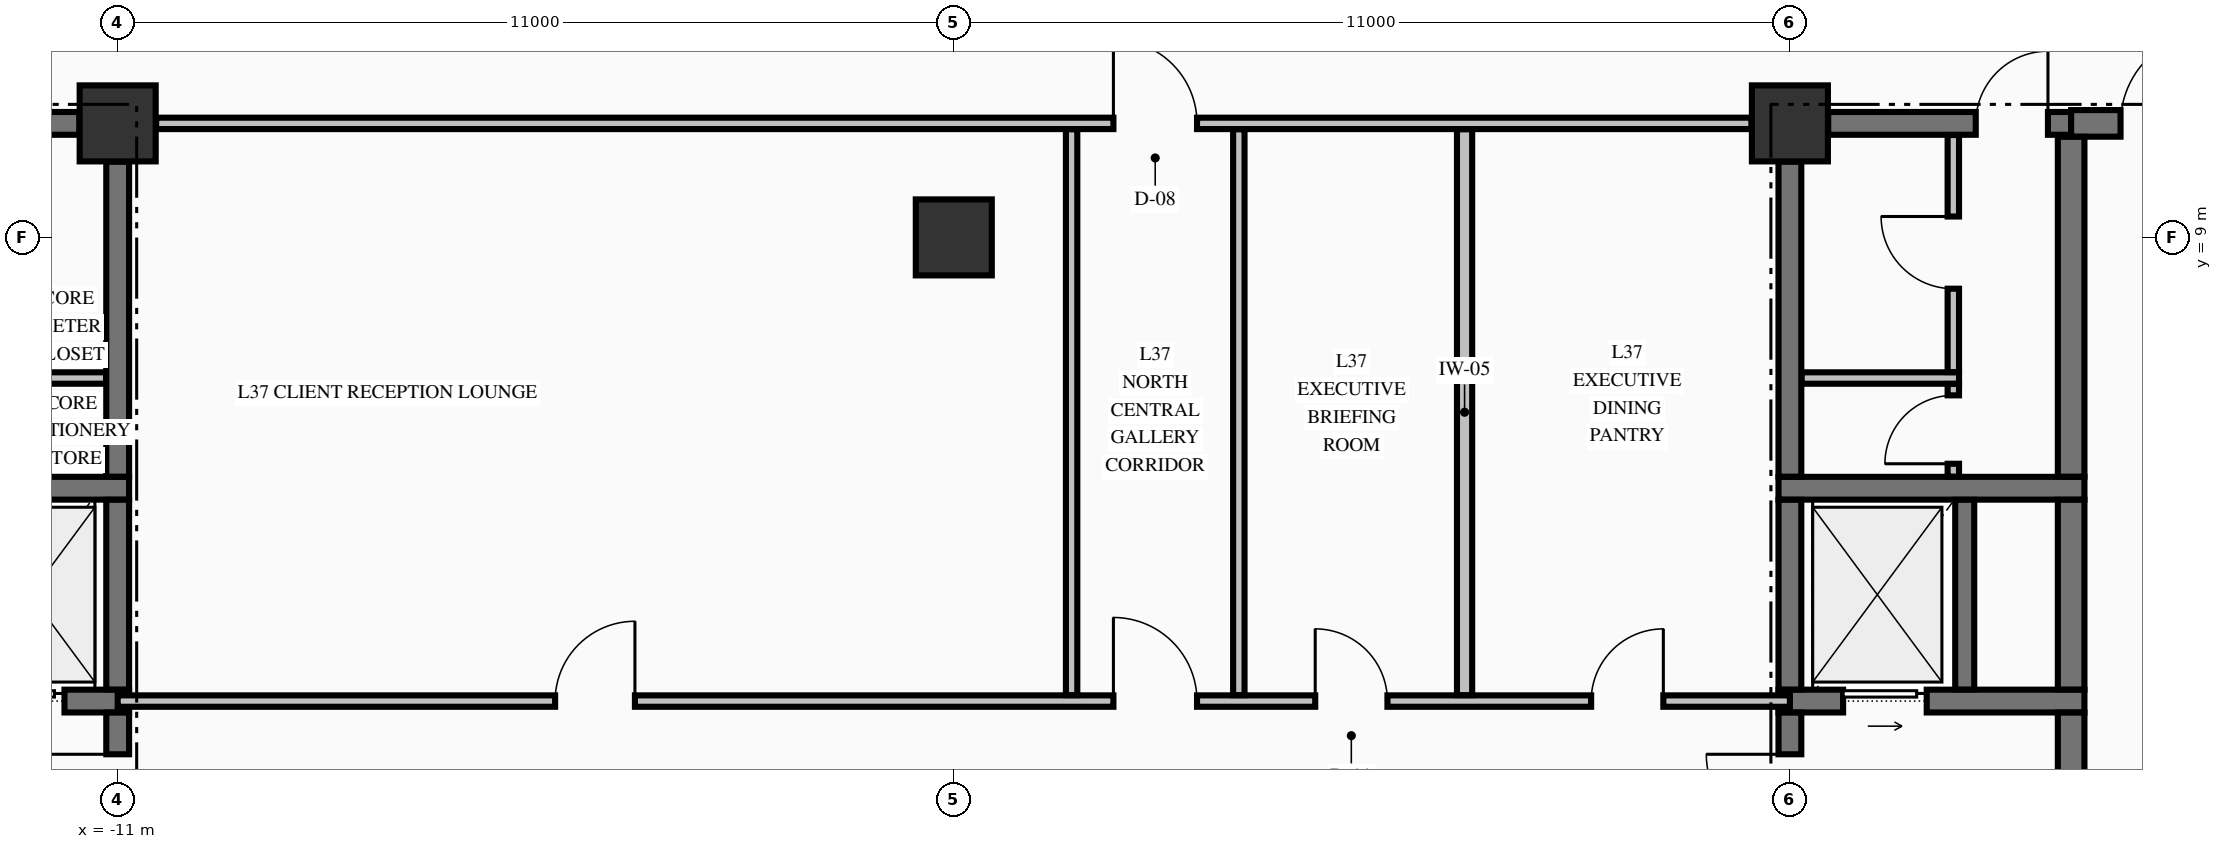
"""IFC4 building model, lengths in metres.
Left out: names, types, materials, properties, quantities, classifications, styles, units other than length and angle.
Written with IfcOpenShell. Run it as: python <this file> out.ifc"""

import sys

from ifc_helpers import new_model, si_unit, direction, frame, frame_2d, origin, origin_2d, place, context, subcontext, project, spatial, rectangle, extrude, element, fill, save


model = new_model("IFC4")
c1 = context("Model", 3, precision=1e-05, world=origin(), true_north=direction((0.0, 1.0)))
c2 = subcontext(c1, "Body", "Model", "MODEL_VIEW")
j1 = project(units=[si_unit("LENGTHUNIT", "METRE"), si_unit("PLANEANGLEUNIT", "RADIAN")], contexts=[c1])
p1 = place(None, origin())
s1 = spatial("IfcSite", under=j1, at=p1, CompositionType="ELEMENT")
p2 = place(p1, origin())
s2 = spatial("IfcBuilding", under=s1, at=p2, CompositionType="ELEMENT")
p3 = place(p2, frame((0.0, 0.0, 146.34)))
s3 = spatial("IfcBuildingStorey", under=s2, at=p3, CompositionType="ELEMENT", Elevation=146.34)
for number, where, z_axis, x_axis in (
    (1, (-11.0, 10.5, -0.25), (0.0, 0.0, 1.0), (1.0, 0.0, 0.0)),
    (2, (11.0, 10.5, -0.25), (0.0, 0.0, 1.0), (1.0, 0.0, 0.0)),
    (3, (0.0, 9.0, -0.25), (0.0, 0.0, 1.0), (1.0, 0.0, 0.0)),
):
    element("IfcColumn", number, at=place(p3, frame(where, z_axis=z_axis, x_axis=x_axis)), inside=s3, PredefinedType="COLUMN", context=c2, shape_type="SweptSolid", body=[
        extrude(rectangle(XDim=1.0, YDim=1.0, at=origin_2d()), origin(), (0.0, 0.0, 1.0), 3.57),
    ])
p4 = place(p3, frame((-14.875, 2.9, 0.0), z_axis=(0.0, 0.0, 1.0), x_axis=(1.0, 0.0, 0.0)))
e4 = element("IfcWall", 4, at=p4, inside=s3, PredefinedType="SHEAR", context=c2, shape_type="SweptSolid", body=[
    extrude(rectangle(XDim=4.025, YDim=0.3, at=frame_2d((2.012, 0.0))), origin(), (0.0, 0.0, 1.0), 3.32),
])
p5 = place(p4, frame((2.075, 0.0, 0.0)))
e5 = element("IfcOpeningElement", 5, at=p5, cuts=e4, PredefinedType="OPENING", context=c2, shape_type="SweptSolid", body=[
    extrude(rectangle(XDim=1.1, YDim=2.2, at=frame_2d((0.55, 1.1))), frame((0.0, 0.16, 0.0), z_axis=(0.0, -1.0, 0.0), x_axis=(1.0, 0.0, 0.0)), (0.0, 0.0, 1.0), 0.32),
])
p6 = place(p3, frame((10.85, 2.9, 0.0), z_axis=(0.0, 0.0, 1.0), x_axis=(1.0, 0.0, 0.0)))
e6 = element("IfcWall", 6, at=p6, inside=s3, PredefinedType="SHEAR", context=c2, shape_type="SweptSolid", body=[
    extrude(rectangle(XDim=4.025, YDim=0.3, at=frame_2d((2.012, 0.0))), origin(), (0.0, 0.0, 1.0), 3.32),
])
p7 = place(p6, frame((0.85, 0.0, 0.0)))
e7 = element("IfcOpeningElement", 7, at=p7, cuts=e6, PredefinedType="OPENING", context=c2, shape_type="SweptSolid", body=[
    extrude(rectangle(XDim=1.1, YDim=2.2, at=frame_2d((0.55, 1.1))), frame((0.0, 0.16, 0.0), z_axis=(0.0, -1.0, 0.0), x_axis=(1.0, 0.0, 0.0)), (0.0, 0.0, 1.0), 0.32),
])
for number, where, z_axis, x_axis in (
    (8, (-14.875, 5.7, 0.0), (0.0, 0.0, 1.0), (1.0, 0.0, 0.0)),
    (9, (10.85, 5.7, 0.0), (0.0, 0.0, 1.0), (1.0, 0.0, 0.0)),
):
    element("IfcWall", number, at=place(p3, frame(where, z_axis=z_axis, x_axis=x_axis)), inside=s3, PredefinedType="SHEAR", context=c2, shape_type="SweptSolid", body=[
        extrude(rectangle(XDim=4.025, YDim=0.3, at=frame_2d((2.012, 0.0))), origin(), (0.0, 0.0, 1.0), 3.32),
    ])
p8 = place(p3, frame((-14.7, 10.5, 0.0), z_axis=(0.0, 0.0, 1.0), x_axis=(1.0, 0.0, 0.0)))
e10 = element("IfcWall", 10, at=p8, inside=s3, PredefinedType="SHEAR", context=c2, shape_type="SweptSolid", body=[
    extrude(rectangle(XDim=3.196, YDim=0.3, at=frame_2d((1.598, 0.0))), origin(), (0.0, 0.0, 1.0), 3.32),
])
p9 = place(p8, frame((0.305, 0.0, 0.0)))
e11 = element("IfcOpeningElement", 11, at=p9, cuts=e10, PredefinedType="OPENING", context=c2, shape_type="SweptSolid", body=[
    extrude(rectangle(XDim=0.95, YDim=2.15, at=frame_2d((0.475, 1.075))), frame((0.0, 0.16, 0.0), z_axis=(0.0, -1.0, 0.0), x_axis=(1.0, 0.0, 0.0)), (0.0, 0.0, 1.0), 0.32),
])
p10 = place(p3, frame((11.504, 10.5, 0.0), z_axis=(0.0, 0.0, 1.0), x_axis=(1.0, 0.0, 0.0)))
e12 = element("IfcWall", 12, at=p10, inside=s3, PredefinedType="SHEAR", context=c2, shape_type="SweptSolid", body=[
    extrude(rectangle(XDim=3.196, YDim=0.3, at=frame_2d((1.598, 0.0))), origin(), (0.0, 0.0, 1.0), 3.32),
])
p11 = place(p10, frame((1.941, 0.0, 0.0)))
e13 = element("IfcOpeningElement", 13, at=p11, cuts=e12, PredefinedType="OPENING", context=c2, shape_type="SweptSolid", body=[
    extrude(rectangle(XDim=0.95, YDim=2.15, at=frame_2d((0.475, 1.075))), frame((0.0, 0.16, 0.0), z_axis=(0.0, -1.0, 0.0), x_axis=(1.0, 0.0, 0.0)), (0.0, 0.0, 1.0), 0.32),
])
p12 = place(p3, frame((14.7, 10.5, 0.0), z_axis=(0.0, 0.0, 1.0), x_axis=(1.0, 0.0, 0.0)))
e14 = element("IfcWall", 14, at=p12, inside=s3, PredefinedType="SHEAR", context=c2, shape_type="SweptSolid", body=[
    extrude(rectangle(XDim=4.796, YDim=0.35, at=frame_2d((2.398, 0.0))), origin(), (0.0, 0.0, 1.0), 3.32),
])
p13 = place(p12, frame((0.65, 0.0, 0.0)))
e15 = element("IfcOpeningElement", 15, at=p13, cuts=e14, PredefinedType="OPENING", context=c2, shape_type="SweptSolid", body=[
    extrude(rectangle(XDim=1.2, YDim=2.15, at=frame_2d((0.6, 1.075))), frame((0.0, 0.185, 0.0), z_axis=(0.0, -1.0, 0.0), x_axis=(1.0, 0.0, 0.0)), (0.0, 0.0, 1.0), 0.37),
])
p14 = place(p12, frame((3.225, 0.0, 0.0)))
e16 = element("IfcOpeningElement", 16, at=p14, cuts=e14, PredefinedType="OPENING", context=c2, shape_type="SweptSolid", body=[
    extrude(rectangle(XDim=0.95, YDim=2.15, at=frame_2d((0.475, 1.075))), frame((0.0, 0.185, 0.0), z_axis=(0.0, -1.0, 0.0), x_axis=(1.0, 0.0, 0.0)), (0.0, 0.0, 1.0), 0.37),
])
p15 = place(p3, frame((-11.0, 2.9, 0.0), z_axis=(0.0, 0.0, 1.0), x_axis=(1.0, 0.0, 0.0)))
e17 = element("IfcWall", 17, at=p15, inside=s3, PredefinedType="PARTITIONING", context=c2, shape_type="SweptSolid", body=[
    extrude(rectangle(XDim=22.0, YDim=0.15, at=frame_2d((11.0, 0.0))), origin(), (0.0, 0.0, 1.0), 3.32),
])
p16 = place(p15, frame((13.1, 0.0, 0.0)))
e18 = element("IfcOpeningElement", 18, at=p16, cuts=e17, PredefinedType="OPENING", context=c2, shape_type="SweptSolid", body=[
    extrude(rectangle(XDim=1.1, YDim=2.15, at=frame_2d((0.55, 1.075))), frame((0.0, 0.085, 0.0), z_axis=(0.0, -1.0, 0.0), x_axis=(1.0, 0.0, 0.0)), (0.0, 0.0, 1.0), 0.17),
])
p17 = place(p15, frame((5.755, 0.0, 0.0)))
e19 = element("IfcOpeningElement", 19, at=p17, cuts=e17, PredefinedType="OPENING", context=c2, shape_type="SweptSolid", body=[
    extrude(rectangle(XDim=1.05, YDim=2.15, at=frame_2d((0.525, 1.075))), frame((0.0, 0.085, 0.0), z_axis=(0.0, -1.0, 0.0), x_axis=(1.0, 0.0, 0.0)), (0.0, 0.0, 1.0), 0.17),
])
p18 = place(p15, frame((15.755, 0.0, 0.0)))
e20 = element("IfcOpeningElement", 20, at=p18, cuts=e17, PredefinedType="OPENING", context=c2, shape_type="SweptSolid", body=[
    extrude(rectangle(XDim=0.95, YDim=2.15, at=frame_2d((0.475, 1.075))), frame((0.0, 0.085, 0.0), z_axis=(0.0, -1.0, 0.0), x_axis=(1.0, 0.0, 0.0)), (0.0, 0.0, 1.0), 0.17),
])
p19 = place(p15, frame((19.385, 0.0, 0.0)))
e21 = element("IfcOpeningElement", 21, at=p19, cuts=e17, PredefinedType="OPENING", context=c2, shape_type="SweptSolid", body=[
    extrude(rectangle(XDim=0.95, YDim=2.15, at=frame_2d((0.475, 1.075))), frame((0.0, 0.085, 0.0), z_axis=(0.0, -1.0, 0.0), x_axis=(1.0, 0.0, 0.0)), (0.0, 0.0, 1.0), 0.17),
])
for number, where, z_axis, x_axis in (
    (22, (-13.225, 7.15, 0.0), (0.0, 0.0, 1.0), (1.0, 0.0, 0.0)),
    (23, (11.153, 7.15, 0.0), (0.0, 0.0, 1.0), (1.0, 0.0, 0.0)),
):
    element("IfcWall", number, at=place(p3, frame(where, z_axis=z_axis, x_axis=x_axis)), inside=s3, PredefinedType="PARTITIONING", context=c2, shape_type="SweptSolid", body=[
        extrude(rectangle(XDim=2.072, YDim=0.15, at=frame_2d((1.036, 0.0))), origin(), (0.0, 0.0, 1.0), 3.32),
    ])
p20 = place(p3, frame((-10.494, 10.5, 0.0), z_axis=(0.0, 0.0, 1.0), x_axis=(1.0, 0.0, 0.0)))
e24 = element("IfcWall", 24, at=p20, inside=s3, PredefinedType="PARTITIONING", context=c2, shape_type="SweptSolid", body=[
    extrude(rectangle(XDim=20.988, YDim=0.15, at=frame_2d((10.494, 0.0))), origin(), (0.0, 0.0, 1.0), 3.32),
])
p21 = place(p20, frame((12.594, 0.0, 0.0)))
e25 = element("IfcOpeningElement", 25, at=p21, cuts=e24, PredefinedType="OPENING", context=c2, shape_type="SweptSolid", body=[
    extrude(rectangle(XDim=1.1, YDim=2.15, at=frame_2d((0.55, 1.075))), frame((0.0, 0.085, 0.0), z_axis=(0.0, -1.0, 0.0), x_axis=(1.0, 0.0, 0.0)), (0.0, 0.0, 1.0), 0.17),
])
p22 = place(p3, frame((-11.0, 0.504, 0.0), z_axis=(0.0, 0.0, 1.0), x_axis=(0.0, 1.0, 0.0)))
e26 = element("IfcWall", 26, at=p22, inside=s3, PredefinedType="SHEAR", context=c2, shape_type="SweptSolid", body=[
    extrude(rectangle(XDim=2.244, YDim=0.3, at=frame_2d((1.122, 0.0))), origin(), (0.0, 0.0, 1.0), 3.32),
])
p23 = place(p22, frame((0.596, 0.0, 0.0)))
e27 = element("IfcOpeningElement", 27, at=p23, cuts=e26, PredefinedType="OPENING", context=c2, shape_type="SweptSolid", body=[
    extrude(rectangle(XDim=1.1, YDim=2.15, at=frame_2d((0.55, 1.075))), frame((0.0, 0.16, 0.0), z_axis=(0.0, -1.0, 0.0), x_axis=(1.0, 0.0, 0.0)), (0.0, 0.0, 1.0), 0.32),
])
p24 = place(p3, frame((-11.0, 3.052, 0.0), z_axis=(0.0, 0.0, 1.0), x_axis=(0.0, 1.0, 0.0)))
e28 = element("IfcWall", 28, at=p24, inside=s3, PredefinedType="SHEAR", context=c2, shape_type="SweptSolid", body=[
    extrude(rectangle(XDim=2.496, YDim=0.3, at=frame_2d((1.248, 0.0))), origin(), (0.0, 0.0, 1.0), 3.32),
])
p25 = place(p3, frame((-11.0, 5.852, 0.0), z_axis=(0.0, 0.0, 1.0), x_axis=(0.0, 1.0, 0.0)))
e29 = element("IfcWall", 29, at=p25, inside=s3, PredefinedType="SHEAR", context=c2, shape_type="SweptSolid", body=[
    extrude(rectangle(XDim=4.144, YDim=0.3, at=frame_2d((2.072, 0.0))), origin(), (0.0, 0.0, 1.0), 3.32),
])
p26 = place(p3, frame((11.0, 0.504, 0.0), z_axis=(0.0, 0.0, 1.0), x_axis=(0.0, 1.0, 0.0)))
e30 = element("IfcWall", 30, at=p26, inside=s3, PredefinedType="SHEAR", context=c2, shape_type="SweptSolid", body=[
    extrude(rectangle(XDim=2.244, YDim=0.3, at=frame_2d((1.122, 0.0))), origin(), (0.0, 0.0, 1.0), 3.32),
])
p27 = place(p26, frame((0.596, 0.0, 0.0)))
e31 = element("IfcOpeningElement", 31, at=p27, cuts=e30, PredefinedType="OPENING", context=c2, shape_type="SweptSolid", body=[
    extrude(rectangle(XDim=1.1, YDim=2.15, at=frame_2d((0.55, 1.075))), frame((0.0, 0.16, 0.0), z_axis=(0.0, -1.0, 0.0), x_axis=(1.0, 0.0, 0.0)), (0.0, 0.0, 1.0), 0.32),
])
p28 = place(p3, frame((11.0, 3.052, 0.0), z_axis=(0.0, 0.0, 1.0), x_axis=(0.0, 1.0, 0.0)))
e32 = element("IfcWall", 32, at=p28, inside=s3, PredefinedType="SHEAR", context=c2, shape_type="SweptSolid", body=[
    extrude(rectangle(XDim=2.496, YDim=0.3, at=frame_2d((1.248, 0.0))), origin(), (0.0, 0.0, 1.0), 3.32),
])
p29 = place(p3, frame((11.0, 5.852, 0.0), z_axis=(0.0, 0.0, 1.0), x_axis=(0.0, 1.0, 0.0)))
e33 = element("IfcWall", 33, at=p29, inside=s3, PredefinedType="SHEAR", context=c2, shape_type="SweptSolid", body=[
    extrude(rectangle(XDim=4.144, YDim=0.3, at=frame_2d((2.072, 0.0))), origin(), (0.0, 0.0, 1.0), 3.32),
])
p30 = place(p3, frame((13.3, 3.052, 0.0), z_axis=(0.0, 0.0, 1.0), x_axis=(0.0, 1.0, 0.0)))
e34 = element("IfcWall", 34, at=p30, inside=s3, PredefinedType="SOLIDWALL", context=c2, shape_type="SweptSolid", body=[
    extrude(rectangle(XDim=2.496, YDim=0.25, at=frame_2d((1.248, 0.0))), origin(), (0.0, 0.0, 1.0), 3.32),
])
p31 = place(p3, frame((14.7, -0.098, 0.0), z_axis=(0.0, 0.0, 1.0), x_axis=(0.0, 1.0, 0.0)))
e35 = element("IfcWall", 35, at=p31, inside=s3, PredefinedType="SHEAR", context=c2, shape_type="SweptSolid", body=[
    extrude(rectangle(XDim=2.846, YDim=0.35, at=frame_2d((1.423, 0.0))), origin(), (0.0, 0.0, 1.0), 3.32),
])
p32 = place(p3, frame((14.7, 3.052, 0.0), z_axis=(0.0, 0.0, 1.0), x_axis=(0.0, 1.0, 0.0)))
e36 = element("IfcWall", 36, at=p32, inside=s3, PredefinedType="SHEAR", context=c2, shape_type="SweptSolid", body=[
    extrude(rectangle(XDim=2.496, YDim=0.35, at=frame_2d((1.248, 0.0))), origin(), (0.0, 0.0, 1.0), 3.32),
])
p33 = place(p3, frame((14.7, 5.852, 0.0), z_axis=(0.0, 0.0, 1.0), x_axis=(0.0, 1.0, 0.0)))
e37 = element("IfcWall", 37, at=p33, inside=s3, PredefinedType="SHEAR", context=c2, shape_type="SweptSolid", body=[
    extrude(rectangle(XDim=4.471, YDim=0.35, at=frame_2d((2.235, 0.0))), origin(), (0.0, 0.0, 1.0), 3.32),
])
for number, where, z_axis, x_axis in (
    (38, (1.55, 2.978, 0.0), (0.0, 0.0, 1.0), (0.0, 1.0, 0.0)),
    (39, (3.75, 2.978, 0.0), (0.0, 0.0, 1.0), (0.0, 1.0, 0.0)),
):
    element("IfcWall", number, at=place(p3, frame(where, z_axis=z_axis, x_axis=x_axis)), inside=s3, PredefinedType="PARTITIONING", context=c2, shape_type="SweptSolid", body=[
        extrude(rectangle(XDim=7.444, YDim=0.15, at=frame_2d((3.722, 0.0))), origin(), (0.0, 0.0, 1.0), 3.32),
    ])
p34 = place(p3, frame((6.72, 2.978, 0.0), z_axis=(0.0, 0.0, 1.0), x_axis=(0.0, 1.0, 0.0)))
e40 = element("IfcWall", 40, at=p34, inside=s3, PredefinedType="PARTITIONING", context=c2, shape_type="SweptSolid", body=[
    extrude(rectangle(XDim=7.444, YDim=0.2, at=frame_2d((3.722, 0.0))), origin(), (0.0, 0.0, 1.0), 3.32),
])
p35 = place(p3, frame((13.15, 5.853, 0.0), z_axis=(0.0, 0.0, 1.0), x_axis=(0.0, 1.0, 0.0)))
e41 = element("IfcWall", 41, at=p35, inside=s3, PredefinedType="PARTITIONING", context=c2, shape_type="SweptSolid", body=[
    extrude(rectangle(XDim=1.219, YDim=0.15, at=frame_2d((0.609, 0.0))), origin(), (0.0, 0.0, 1.0), 3.32),
])
p36 = place(p35, frame((0.169, 0.0, 0.0)))
e42 = element("IfcOpeningElement", 42, at=p36, cuts=e41, PredefinedType="OPENING", context=c2, shape_type="SweptSolid", body=[
    extrude(rectangle(XDim=0.9, YDim=2.15, at=frame_2d((0.45, 1.075))), frame((0.0, 0.085, 0.0), z_axis=(0.0, -1.0, 0.0), x_axis=(1.0, 0.0, 0.0)), (0.0, 0.0, 1.0), 0.17),
])
p37 = place(p3, frame((13.15, 7.228, 0.0), z_axis=(0.0, 0.0, 1.0), x_axis=(0.0, 1.0, 0.0)))
e43 = element("IfcWall", 43, at=p37, inside=s3, PredefinedType="PARTITIONING", context=c2, shape_type="SweptSolid", body=[
    extrude(rectangle(XDim=3.119, YDim=0.15, at=frame_2d((1.56, 0.0))), origin(), (0.0, 0.0, 1.0), 3.32),
])
p38 = place(p37, frame((1.097, 0.0, 0.0)))
e44 = element("IfcOpeningElement", 44, at=p38, cuts=e43, PredefinedType="OPENING", context=c2, shape_type="SweptSolid", body=[
    extrude(rectangle(XDim=0.95, YDim=2.15, at=frame_2d((0.475, 1.075))), frame((0.0, 0.085, 0.0), z_axis=(0.0, -1.0, 0.0), x_axis=(1.0, 0.0, 0.0)), (0.0, 0.0, 1.0), 0.17),
])
p39 = place(p23, origin())
e45 = element("IfcDoor", 45, at=p39, inside=s3, OperationType="SINGLE_SWING_RIGHT", PredefinedType="DOOR", context=c2, shape_type="SweptSolid", body=[
    extrude(rectangle(XDim=1.1, YDim=2.15, at=frame_2d((0.55, 1.075))), frame((0.0, 0.025, 0.0), z_axis=(0.0, -1.0, 0.0), x_axis=(1.0, 0.0, 0.0)), (0.0, 0.0, 1.0), 0.05),
])
fill(e27, e45)
p40 = place(p5, origin())
e46 = element("IfcDoor", 46, at=p40, inside=s3, OperationType="SLIDING_TO_LEFT", PredefinedType="DOOR", context=c2, shape_type="SweptSolid", body=[
    extrude(rectangle(XDim=1.1, YDim=2.2, at=frame_2d((0.55, 1.1))), frame((0.0, 0.025, 0.0), z_axis=(0.0, -1.0, 0.0), x_axis=(1.0, 0.0, 0.0)), (0.0, 0.0, 1.0), 0.05),
])
fill(e5, e46)
p41 = place(p27, origin())
e47 = element("IfcDoor", 47, at=p41, inside=s3, OperationType="SINGLE_SWING_RIGHT", PredefinedType="DOOR", context=c2, shape_type="SweptSolid", body=[
    extrude(rectangle(XDim=1.1, YDim=2.15, at=frame_2d((0.55, 1.075))), frame((0.0, 0.025, 0.0), z_axis=(0.0, -1.0, 0.0), x_axis=(1.0, 0.0, 0.0)), (0.0, 0.0, 1.0), 0.05),
])
fill(e31, e47)
p42 = place(p7, origin())
e48 = element("IfcDoor", 48, at=p42, inside=s3, OperationType="SLIDING_TO_RIGHT", PredefinedType="DOOR", context=c2, shape_type="SweptSolid", body=[
    extrude(rectangle(XDim=1.1, YDim=2.2, at=frame_2d((0.55, 1.1))), frame((0.0, 0.025, 0.0), z_axis=(0.0, -1.0, 0.0), x_axis=(1.0, 0.0, 0.0)), (0.0, 0.0, 1.0), 0.05),
])
fill(e7, e48)
p43 = place(p11, origin())
e49 = element("IfcDoor", 49, at=p43, inside=s3, OperationType="SINGLE_SWING_RIGHT", PredefinedType="DOOR", context=c2, shape_type="SweptSolid", body=[
    extrude(rectangle(XDim=0.95, YDim=2.15, at=frame_2d((0.475, 1.075))), frame((0.0, 0.025, 0.0), z_axis=(0.0, -1.0, 0.0), x_axis=(1.0, 0.0, 0.0)), (0.0, 0.0, 1.0), 0.05),
])
fill(e13, e49)
p44 = place(p36, origin())
e50 = element("IfcDoor", 50, at=p44, inside=s3, OperationType="SINGLE_SWING_LEFT", PredefinedType="DOOR", context=c2, shape_type="SweptSolid", body=[
    extrude(rectangle(XDim=0.9, YDim=2.15, at=frame_2d((0.45, 1.075))), frame((0.0, 0.025, 0.0), z_axis=(0.0, -1.0, 0.0), x_axis=(1.0, 0.0, 0.0)), (0.0, 0.0, 1.0), 0.05),
])
fill(e42, e50)
p45 = place(p38, origin())
e51 = element("IfcDoor", 51, at=p45, inside=s3, OperationType="SINGLE_SWING_RIGHT", PredefinedType="DOOR", context=c2, shape_type="SweptSolid", body=[
    extrude(rectangle(XDim=0.95, YDim=2.15, at=frame_2d((0.475, 1.075))), frame((0.0, 0.025, 0.0), z_axis=(0.0, -1.0, 0.0), x_axis=(1.0, 0.0, 0.0)), (0.0, 0.0, 1.0), 0.05),
])
fill(e44, e51)
p46 = place(p13, origin())
e52 = element("IfcDoor", 52, at=p46, inside=s3, OperationType="SINGLE_SWING_RIGHT", PredefinedType="DOOR", context=c2, shape_type="SweptSolid", body=[
    extrude(rectangle(XDim=1.2, YDim=2.15, at=frame_2d((0.6, 1.075))), frame((0.0, 0.025, 0.0), z_axis=(0.0, -1.0, 0.0), x_axis=(1.0, 0.0, 0.0)), (0.0, 0.0, 1.0), 0.05),
])
fill(e15, e52)
p47 = place(p21, origin())
e53 = element("IfcDoor", 53, at=p47, inside=s3, OperationType="SINGLE_SWING_LEFT", PredefinedType="DOOR", context=c2, shape_type="SweptSolid", body=[
    extrude(rectangle(XDim=1.1, YDim=2.15, at=frame_2d((0.55, 1.075))), frame((0.0, 0.025, 0.0), z_axis=(0.0, -1.0, 0.0), x_axis=(1.0, 0.0, 0.0)), (0.0, 0.0, 1.0), 0.05),
])
fill(e25, e53)
p48 = place(p16, origin())
e54 = element("IfcDoor", 54, at=p48, inside=s3, OperationType="SINGLE_SWING_LEFT", PredefinedType="DOOR", context=c2, shape_type="SweptSolid", body=[
    extrude(rectangle(XDim=1.1, YDim=2.15, at=frame_2d((0.55, 1.075))), frame((0.0, 0.025, 0.0), z_axis=(0.0, -1.0, 0.0), x_axis=(1.0, 0.0, 0.0)), (0.0, 0.0, 1.0), 0.05),
])
fill(e18, e54)
p49 = place(p17, origin())
e55 = element("IfcDoor", 55, at=p49, inside=s3, OperationType="SINGLE_SWING_RIGHT", PredefinedType="DOOR", context=c2, shape_type="SweptSolid", body=[
    extrude(rectangle(XDim=1.05, YDim=2.15, at=frame_2d((0.525, 1.075))), frame((0.0, 0.025, 0.0), z_axis=(0.0, -1.0, 0.0), x_axis=(1.0, 0.0, 0.0)), (0.0, 0.0, 1.0), 0.05),
])
fill(e19, e55)
p50 = place(p18, origin())
e56 = element("IfcDoor", 56, at=p50, inside=s3, OperationType="SINGLE_SWING_LEFT", PredefinedType="DOOR", context=c2, shape_type="SweptSolid", body=[
    extrude(rectangle(XDim=0.95, YDim=2.15, at=frame_2d((0.475, 1.075))), frame((0.0, 0.025, 0.0), z_axis=(0.0, -1.0, 0.0), x_axis=(1.0, 0.0, 0.0)), (0.0, 0.0, 1.0), 0.05),
])
fill(e20, e56)
p51 = place(p19, origin())
e57 = element("IfcDoor", 57, at=p51, inside=s3, OperationType="SINGLE_SWING_RIGHT", PredefinedType="DOOR", context=c2, shape_type="SweptSolid", body=[
    extrude(rectangle(XDim=0.95, YDim=2.15, at=frame_2d((0.475, 1.075))), frame((0.0, 0.025, 0.0), z_axis=(0.0, -1.0, 0.0), x_axis=(1.0, 0.0, 0.0)), (0.0, 0.0, 1.0), 0.05),
])
fill(e21, e57)
save(model, sys.argv[1])
